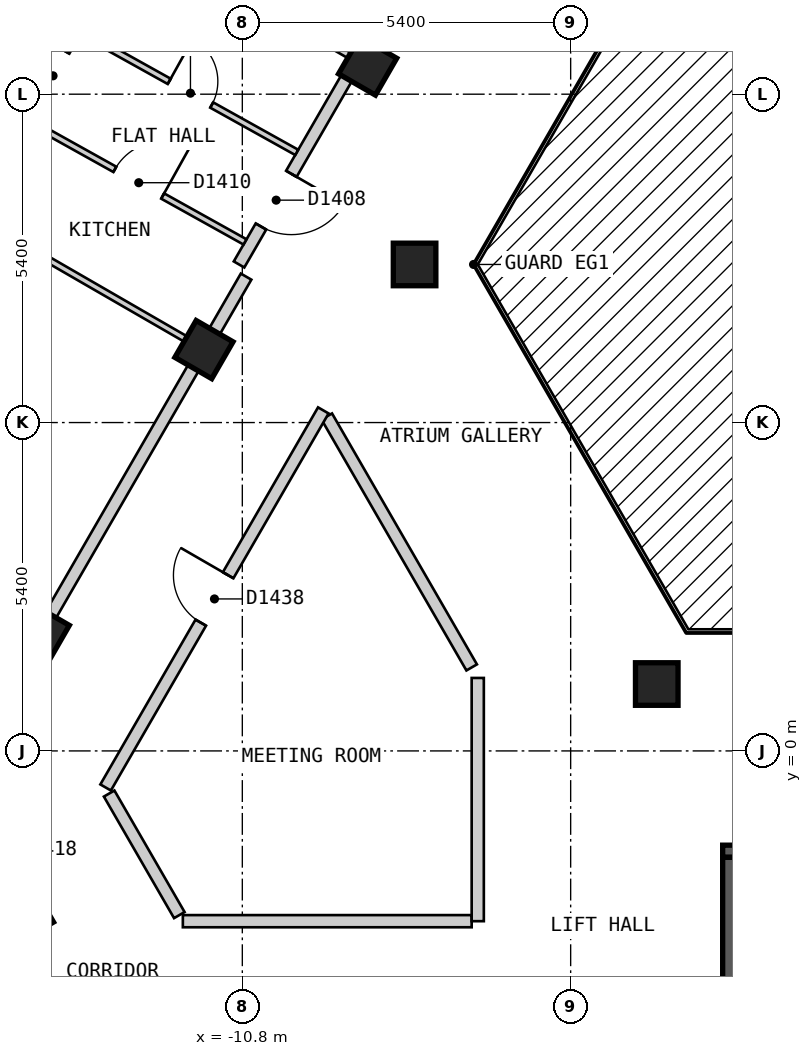
"""IFC4 building model, lengths in metres.
Left out: names, types, materials, properties, quantities, classifications, styles, units other than length and angle.
Written with IfcOpenShell. Run it as: python <this file> out.ifc"""

import sys

from ifc_helpers import new_model, si_unit, direction, frame, frame_2d, origin, origin_2d, place, context, subcontext, project, spatial, rectangle, extrude, element, fill, save


model = new_model("IFC4")
c1 = context("Model", 3, precision=1e-05, world=origin(), true_north=direction((0.0, 1.0)))
c2 = subcontext(c1, "Body", "Model", "MODEL_VIEW")
j1 = project(units=[si_unit("LENGTHUNIT", "METRE"), si_unit("PLANEANGLEUNIT", "RADIAN")], contexts=[c1])
p1 = place(None, origin())
s1 = spatial("IfcSite", under=j1, at=p1, CompositionType="ELEMENT")
p2 = place(p1, origin())
s2 = spatial("IfcBuilding", under=s1, at=p2, CompositionType="ELEMENT")
p3 = place(p2, frame((0.0, 0.0, 166.2)))
s3 = spatial("IfcBuildingStorey", under=s2, at=p3, CompositionType="ELEMENT", Elevation=166.2)
for number, where, z_axis, x_axis in (
    (1, (-14.383, -2.687, 0.0), (0.0, 0.0, 1.0), (0.5, -0.866, 0.0)),
    (2, (-8.739, 11.263, 0.0), (0.0, 0.0, 1.0), (-0.5, -0.866, 0.0)),
    (3, (-7.967, 8.0, 0.0), (0.0, 0.0, 1.0), (1.0, 0.0, 0.0)),
    (4, (-11.431, 6.6, 0.0), (0.0, 0.0, 1.0), (-0.5, -0.866, 0.0)),
    (5, (-3.984, 1.1, 0.0), (0.0, 0.0, 1.0), (1.0, 0.0, 0.0)),
    (6, (-14.123, 1.937, 0.0), (0.0, 0.0, 1.0), (-0.5, -0.866, 0.0)),
):
    element("IfcColumn", number, at=place(p3, frame(where, z_axis=z_axis, x_axis=x_axis)), inside=s3, PredefinedType="COLUMN", context=c2, shape_type="SweptSolid", body=[
        extrude(rectangle(XDim=0.7, YDim=0.7, at=origin_2d()), origin(), (0.0, 0.0, 1.0), 3.0),
    ])
p4 = place(p3, frame((-2.9, -1.65, 0.0), z_axis=(0.0, 0.0, 1.0), x_axis=(1.0, 0.0, 0.0)))
e7 = element("IfcWall", 7, at=p4, inside=s3, PredefinedType="SOLIDWALL", context=c2, shape_type="SweptSolid", body=[
    extrude(rectangle(XDim=5.8, YDim=0.2, at=frame_2d((2.9, 0.0))), origin(), (0.0, 0.0, 1.0), 2.7),
])
p5 = place(p4, frame((0.3, 0.0, 0.0)))
e8 = element("IfcOpeningElement", 8, at=p5, cuts=e7, PredefinedType="OPENING", context=c2, shape_type="SweptSolid", body=[
    extrude(rectangle(XDim=1.2, YDim=2.1, at=frame_2d((0.6, 1.05))), frame((0.0, 0.11, 0.0), z_axis=(0.0, -1.0, 0.0), x_axis=(1.0, 0.0, 0.0)), (0.0, 0.0, 1.0), 0.22),
])
p6 = place(p3, frame((-2.8, -4.5, 0.0), z_axis=(0.0, 0.0, 1.0), x_axis=(0.0, 1.0, 0.0)))
e9 = element("IfcWall", 9, at=p6, inside=s3, PredefinedType="SOLIDWALL", context=c2, shape_type="SweptSolid", body=[
    extrude(rectangle(XDim=2.75, YDim=0.2, at=frame_2d((1.375, 0.0))), origin(), (0.0, 0.0, 1.0), 2.7),
])
p7 = place(p3, frame((-9.411, 5.5, 0.0), z_axis=(0.0, 0.0, 1.0), x_axis=(0.500018099276, -0.86601495391, 0.0)))
e10 = element("IfcWall", 10, at=p7, inside=s3, PredefinedType="PARTITIONING", context=c2, shape_type="SweptSolid", body=[
    extrude(rectangle(XDim=4.765, YDim=0.2, at=frame_2d((2.383, 0.0))), origin(), (0.0, 0.0, 1.0), 2.7),
])
p8 = place(p3, frame((-12.99, -0.701, 0.0), z_axis=(0.0, 0.0, 1.0), x_axis=(0.499972710878, -0.866041158593, 0.0)))
e11 = element("IfcWall", 11, at=p8, inside=s3, PredefinedType="PARTITIONING", context=c2, shape_type="SweptSolid", body=[
    extrude(rectangle(XDim=2.308, YDim=0.2, at=frame_2d((1.154, 0.0))), origin(), (0.0, 0.0, 1.0), 2.7),
])
p9 = place(p3, frame((-11.778, -2.8, 0.0), z_axis=(0.0, 0.0, 1.0), x_axis=(1.0, 0.0, 0.0)))
e12 = element("IfcWall", 12, at=p9, inside=s3, PredefinedType="PARTITIONING", context=c2, shape_type="SweptSolid", body=[
    extrude(rectangle(XDim=4.75, YDim=0.2, at=frame_2d((2.375, 0.0))), origin(), (0.0, 0.0, 1.0), 2.7),
])
p10 = place(p3, frame((-13.048, -0.601, 0.0), z_axis=(0.0, 0.0, 1.0), x_axis=(0.499982180423, 0.866035691677, 0.0)))
e13 = element("IfcWall", 13, at=p10, inside=s3, PredefinedType="PARTITIONING", context=c2, shape_type="SweptSolid", body=[
    extrude(rectangle(XDim=7.16, YDim=0.2, at=frame_2d((3.58, 0.0))), origin(), (0.0, 0.0, 1.0), 2.7),
])
p11 = place(p10, frame((3.13, 0.0, 0.0)))
e14 = element("IfcOpeningElement", 14, at=p11, cuts=e13, PredefinedType="OPENING", context=c2, shape_type="SweptSolid", body=[
    extrude(rectangle(XDim=0.9, YDim=2.1, at=frame_2d((0.45, 1.05))), frame((0.0, 0.11, 0.0), z_axis=(0.0, -1.0, 0.0), x_axis=(1.0, 0.0, 0.0)), (0.0, 0.0, 1.0), 0.22),
])
p12 = place(p3, frame((-15.53, -0.501, 0.0), z_axis=(0.0, 0.0, 1.0), x_axis=(0.499952498232, 0.866052827206, 0.0)))
e15 = element("IfcWall", 15, at=p12, inside=s3, PredefinedType="PARTITIONING", context=c2, shape_type="SweptSolid", body=[
    extrude(rectangle(XDim=9.585, YDim=0.2, at=frame_2d((4.792, 0.0))), origin(), (0.0, 0.0, 1.0), 2.7),
])
p13 = place(p3, frame((-10.854, 8.0, 0.0), z_axis=(0.0, 0.0, 1.0), x_axis=(0.499997637144, 0.866026767976, 0.0)))
e16 = element("IfcWall", 16, at=p13, inside=s3, PredefinedType="PARTITIONING", context=c2, shape_type="SweptSolid", body=[
    extrude(rectangle(XDim=10.854, YDim=0.2, at=frame_2d((5.427, 0.0))), origin(), (0.0, 0.0, 1.0), 2.7),
])
p14 = place(p13, frame((0.721, 0.0, 0.0)))
e17 = element("IfcOpeningElement", 17, at=p14, cuts=e16, PredefinedType="OPENING", context=c2, shape_type="SweptSolid", body=[
    extrude(rectangle(XDim=1.0, YDim=2.1, at=frame_2d((0.5, 1.05))), frame((0.0, 0.11, 0.0), z_axis=(0.0, -1.0, 0.0), x_axis=(1.0, 0.0, 0.0)), (0.0, 0.0, 1.0), 0.22),
])
p15 = place(p3, frame((-6.928, -2.8, 0.0), z_axis=(0.0, 0.0, 1.0), x_axis=(0.0, 1.0, 0.0)))
e18 = element("IfcWall", 18, at=p15, inside=s3, PredefinedType="PARTITIONING", context=c2, shape_type="SweptSolid", body=[
    extrude(rectangle(XDim=4.0, YDim=0.2, at=frame_2d((2.0, 0.0))), origin(), (0.0, 0.0, 1.0), 2.7),
])
p16 = place(p3, frame((-13.444, 11.814, 0.0), z_axis=(0.0, 0.0, 1.0), x_axis=(0.873653620945, -0.486548405207, 0.0)))
e19 = element("IfcWall", 19, at=p16, inside=s3, PredefinedType="PARTITIONING", context=c2, shape_type="SweptSolid", body=[
    extrude(rectangle(XDim=4.051, YDim=0.1, at=frame_2d((2.025, 0.0))), origin(), (0.0, 0.0, 1.0), 2.7),
])
p17 = place(p16, frame((1.65, 0.0, 0.0)))
e20 = element("IfcOpeningElement", 20, at=p17, cuts=e19, PredefinedType="OPENING", context=c2, shape_type="SweptSolid", body=[
    extrude(rectangle(XDim=0.8, YDim=2.1, at=frame_2d((0.4, 1.05))), frame((0.0, 0.06, 0.0), z_axis=(0.0, -1.0, 0.0), x_axis=(1.0, 0.0, 0.0)), (0.0, 0.0, 1.0), 0.12),
])
p18 = place(p3, frame((-14.294, 10.342, 0.0), z_axis=(0.0, 0.0, 1.0), x_axis=(0.873582256032, -0.486676527013, 0.0)))
e21 = element("IfcWall", 21, at=p18, inside=s3, PredefinedType="PARTITIONING", context=c2, shape_type="SweptSolid", body=[
    extrude(rectangle(XDim=4.05, YDim=0.1, at=frame_2d((2.025, 0.0))), origin(), (0.0, 0.0, 1.0), 2.7),
])
p19 = place(p18, frame((1.6, 0.0, 0.0)))
e22 = element("IfcOpeningElement", 22, at=p19, cuts=e21, PredefinedType="OPENING", context=c2, shape_type="SweptSolid", body=[
    extrude(rectangle(XDim=0.9, YDim=2.1, at=frame_2d((0.45, 1.05))), frame((0.0, 0.06, 0.0), z_axis=(0.0, -1.0, 0.0), x_axis=(1.0, 0.0, 0.0)), (0.0, 0.0, 1.0), 0.12),
])
p20 = place(p3, frame((-15.199, 8.775, 0.0), z_axis=(0.0, 0.0, 1.0), x_axis=(0.866043063166, -0.499969411806, 0.0)))
e23 = element("IfcWall", 23, at=p20, inside=s3, PredefinedType="PARTITIONING", context=c2, shape_type="SweptSolid", body=[
    extrude(rectangle(XDim=4.25, YDim=0.1, at=frame_2d((2.125, 0.0))), origin(), (0.0, 0.0, 1.0), 2.7),
])
p21 = place(p3, frame((-15.704, 8.0, 0.0), z_axis=(0.0, 0.0, 1.0), x_axis=(0.500005637941, 0.866022148693, 0.0)))
e24 = element("IfcWall", 24, at=p21, inside=s3, PredefinedType="PARTITIONING", context=c2, shape_type="SweptSolid", body=[
    extrude(rectangle(XDim=11.592, YDim=0.1, at=frame_2d((5.796, 0.0))), origin(), (0.0, 0.0, 1.0), 2.7),
])
p22 = place(p21, frame((3.132, 0.0, 0.0)))
e25 = element("IfcOpeningElement", 25, at=p22, cuts=e24, PredefinedType="OPENING", context=c2, shape_type="SweptSolid", body=[
    extrude(rectangle(XDim=0.9, YDim=2.1, at=frame_2d((0.45, 1.05))), frame((0.0, 0.06, 0.0), z_axis=(0.0, -1.0, 0.0), x_axis=(1.0, 0.0, 0.0)), (0.0, 0.0, 1.0), 0.12),
])
p23 = place(p21, frame((8.6, 0.0, 0.0)))
e26 = element("IfcOpeningElement", 26, at=p23, cuts=e24, PredefinedType="OPENING", context=c2, shape_type="SweptSolid", body=[
    extrude(rectangle(XDim=0.8, YDim=2.1, at=frame_2d((0.4, 1.05))), frame((0.0, 0.06, 0.0), z_axis=(0.0, -1.0, 0.0), x_axis=(1.0, 0.0, 0.0)), (0.0, 0.0, 1.0), 0.12),
])
p24 = place(p3, frame((-12.55, 13.463, 0.0), z_axis=(0.0, 0.0, 1.0), x_axis=(0.86606561423, -0.499930346997, 0.0)))
e27 = element("IfcWall", 27, at=p24, inside=s3, PredefinedType="PARTITIONING", context=c2, shape_type="SweptSolid", body=[
    extrude(rectangle(XDim=4.1, YDim=0.1, at=frame_2d((2.05, 0.0))), origin(), (0.0, 0.0, 1.0), 2.7),
])
p25 = place(p14, origin())
e28 = element("IfcDoor", 28, at=p25, inside=s3, OperationType="SINGLE_SWING_RIGHT", PredefinedType="DOOR", context=c2, shape_type="SweptSolid", body=[
    extrude(rectangle(XDim=1.0, YDim=2.1, at=frame_2d((0.5, 1.05))), frame((0.0, 0.025, 0.0), z_axis=(0.0, -1.0, 0.0), x_axis=(1.0, 0.0, 0.0)), (0.0, 0.0, 1.0), 0.05),
])
fill(e17, e28)
p26 = place(p17, origin())
e29 = element("IfcDoor", 29, at=p26, inside=s3, OperationType="SINGLE_SWING_LEFT", PredefinedType="DOOR", context=c2, shape_type="SweptSolid", body=[
    extrude(rectangle(XDim=0.8, YDim=2.1, at=frame_2d((0.4, 1.05))), frame((0.0, 0.025, 0.0), z_axis=(0.0, -1.0, 0.0), x_axis=(1.0, 0.0, 0.0)), (0.0, 0.0, 1.0), 0.05),
])
fill(e20, e29)
p27 = place(p19, origin())
e30 = element("IfcDoor", 30, at=p27, inside=s3, OperationType="SINGLE_SWING_RIGHT", PredefinedType="DOOR", context=c2, shape_type="SweptSolid", body=[
    extrude(rectangle(XDim=0.9, YDim=2.1, at=frame_2d((0.45, 1.05))), frame((0.0, 0.025, 0.0), z_axis=(0.0, -1.0, 0.0), x_axis=(1.0, 0.0, 0.0)), (0.0, 0.0, 1.0), 0.05),
])
fill(e22, e30)
p28 = place(p22, origin())
e31 = element("IfcDoor", 31, at=p28, inside=s3, OperationType="SINGLE_SWING_LEFT", PredefinedType="DOOR", context=c2, shape_type="SweptSolid", body=[
    extrude(rectangle(XDim=0.9, YDim=2.1, at=frame_2d((0.45, 1.05))), frame((0.0, 0.025, 0.0), z_axis=(0.0, -1.0, 0.0), x_axis=(1.0, 0.0, 0.0)), (0.0, 0.0, 1.0), 0.05),
])
fill(e25, e31)
p29 = place(p11, origin())
e32 = element("IfcDoor", 32, at=p29, inside=s3, OperationType="SINGLE_SWING_RIGHT", PredefinedType="DOOR", context=c2, shape_type="SweptSolid", body=[
    extrude(rectangle(XDim=0.9, YDim=2.1, at=frame_2d((0.45, 1.05))), frame((0.0, 0.025, 0.0), z_axis=(0.0, -1.0, 0.0), x_axis=(1.0, 0.0, 0.0)), (0.0, 0.0, 1.0), 0.05),
])
fill(e14, e32)
save(model, sys.argv[1])
